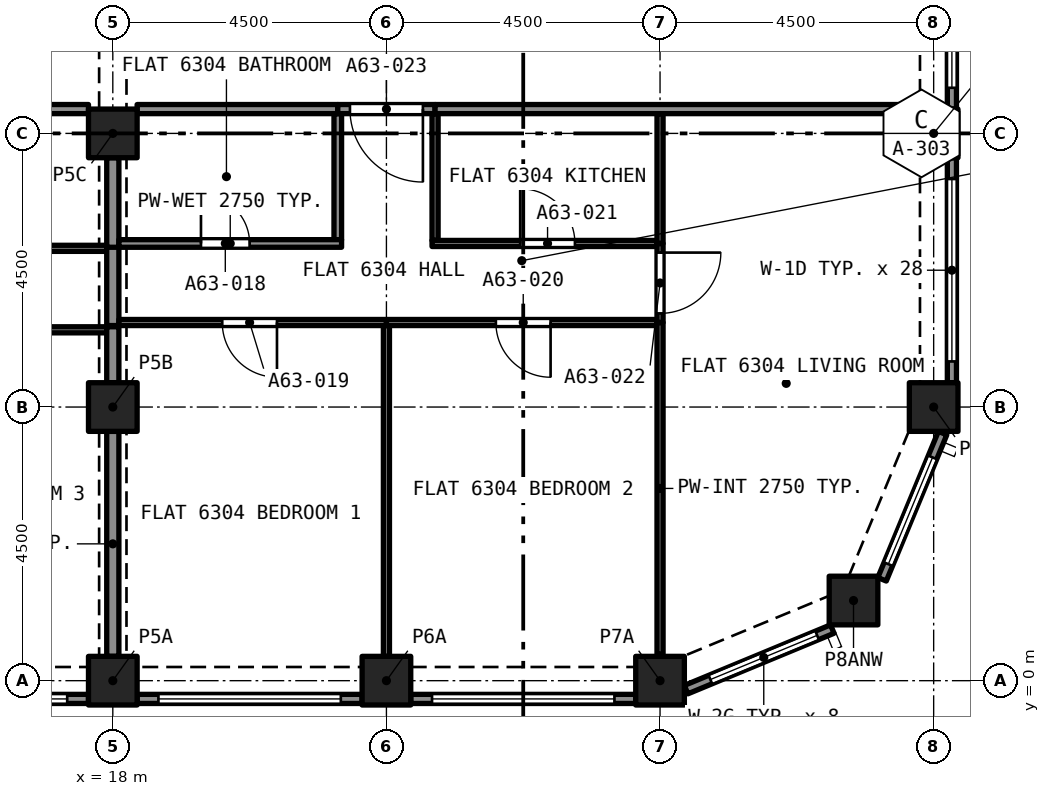
"""IFC4 building model, lengths in metres.
Left out: names, types, materials, properties, quantities, classifications, styles, units other than length and angle.
Written with IfcOpenShell. Run it as: python <this file> out.ifc"""

import sys

from ifc_helpers import new_model, si_unit, direction, frame, frame_2d, origin, origin_2d, place, context, subcontext, project, spatial, rectangle, extrude, element, fill, save


model = new_model("IFC4")
c1 = context("Model", 3, precision=1e-05, world=origin(), true_north=direction((0.0, 1.0)))
c2 = subcontext(c1, "Body", "Model", "MODEL_VIEW")
j1 = project(units=[si_unit("LENGTHUNIT", "METRE"), si_unit("PLANEANGLEUNIT", "RADIAN")], contexts=[c1])
p1 = place(None, origin())
s1 = spatial("IfcSite", under=j1, at=p1, CompositionType="ELEMENT")
p2 = place(p1, origin())
s2 = spatial("IfcBuilding", under=s1, at=p2, CompositionType="ELEMENT")
p3 = place(p2, frame((0.0, 0.0, 226.095)))
s3 = spatial("IfcBuildingStorey", under=s2, at=p3, CompositionType="ELEMENT", Elevation=226.095)
for number, where, z_axis, x_axis in (
    (1, (18.0, 0.0, 0.0), (0.0, 0.0, 1.0), (1.0, 0.0, 0.0)),
    (2, (22.5, 0.0, 0.0), (0.0, 0.0, 1.0), (1.0, 0.0, 0.0)),
    (3, (27.0, 0.0, 0.0), (0.0, 0.0, 1.0), (1.0, 0.0, 0.0)),
    (4, (30.182, 1.318, 0.0), (0.0, 0.0, 1.0), (1.0, 0.0, 0.0)),
    (5, (18.0, 4.5, 0.0), (0.0, 0.0, 1.0), (1.0, 0.0, 0.0)),
    (6, (31.5, 4.5, 0.0), (0.0, 0.0, 1.0), (1.0, 0.0, 0.0)),
    (7, (18.0, 9.0, 0.0), (0.0, 0.0, 1.0), (1.0, 0.0, 0.0)),
    (8, (31.5, 9.0, 0.0), (0.0, 0.0, 1.0), (1.0, 0.0, 0.0)),
):
    element("IfcColumn", number, at=place(p3, frame(where, z_axis=z_axis, x_axis=x_axis)), inside=s3, PredefinedType="COLUMN", context=c2, shape_type="SweptSolid", body=[
        extrude(rectangle(XDim=0.8, YDim=0.8, at=origin_2d()), origin(), (0.0, 0.0, 1.0), 3.2),
    ])
p4 = place(p3, frame((29.833, 0.849, 0.0), z_axis=(0.0, 0.0, 1.0), x_axis=(-0.923885342263, -0.382669406082, 0.0)))
e9 = element("IfcWall", 9, at=p4, inside=s3, PredefinedType="SOLIDWALL", context=c2, shape_type="SweptSolid", body=[
    extrude(rectangle(XDim=2.602, YDim=0.15, at=frame_2d((1.301, 0.0))), origin(), (0.0, 0.0, 1.0), 3.2),
])
p5 = place(p4, frame((0.27, 0.0, 0.45)))
e10 = element("IfcOpeningElement", 10, at=p5, cuts=e9, PredefinedType="OPENING", context=c2, shape_type="SweptSolid", body=[
    extrude(rectangle(XDim=1.9, YDim=1.95, at=frame_2d((0.95, 0.975))), frame((0.0, 0.085, 0.0), z_axis=(0.0, -1.0, 0.0), x_axis=(1.0, 0.0, 0.0)), (0.0, 0.0, 1.0), 0.17),
])
p6 = place(p3, frame((31.647, 4.071, 0.0), z_axis=(0.0, 0.0, 1.0), x_axis=(-0.382669406082, -0.923885342263, 0.0)))
e11 = element("IfcWall", 11, at=p6, inside=s3, PredefinedType="SOLIDWALL", context=c2, shape_type="SweptSolid", body=[
    extrude(rectangle(XDim=2.602, YDim=0.15, at=frame_2d((1.301, 0.0))), origin(), (0.0, 0.0, 1.0), 3.2),
])
p7 = place(p6, frame((0.432, 0.0, 0.45)))
e12 = element("IfcOpeningElement", 12, at=p7, cuts=e11, PredefinedType="OPENING", context=c2, shape_type="SweptSolid", body=[
    extrude(rectangle(XDim=1.9, YDim=1.95, at=frame_2d((0.95, 0.975))), frame((0.0, 0.085, 0.0), z_axis=(0.0, -1.0, 0.0), x_axis=(1.0, 0.0, 0.0)), (0.0, 0.0, 1.0), 0.17),
])
p8 = place(p3, frame((31.8, 8.6, 0.0), z_axis=(0.0, 0.0, 1.0), x_axis=(0.0, -1.0, 0.0)))
e13 = element("IfcWall", 13, at=p8, inside=s3, PredefinedType="SOLIDWALL", context=c2, shape_type="SweptSolid", body=[
    extrude(rectangle(XDim=3.7, YDim=0.15, at=frame_2d((1.85, 0.0))), origin(), (0.0, 0.0, 1.0), 3.2),
])
p9 = place(p8, frame((0.35, 0.0, 0.45)))
e14 = element("IfcOpeningElement", 14, at=p9, cuts=e13, PredefinedType="OPENING", context=c2, shape_type="SweptSolid", body=[
    extrude(rectangle(XDim=3.0, YDim=1.95, at=frame_2d((1.5, 0.975))), frame((0.0, 0.085, 0.0), z_axis=(0.0, -1.0, 0.0), x_axis=(1.0, 0.0, 0.0)), (0.0, 0.0, 1.0), 0.17),
])
p10 = place(p3, frame((31.8, 13.1, 0.0), z_axis=(0.0, 0.0, 1.0), x_axis=(0.0, -1.0, 0.0)))
e15 = element("IfcWall", 15, at=p10, inside=s3, PredefinedType="SOLIDWALL", context=c2, shape_type="SweptSolid", body=[
    extrude(rectangle(XDim=3.7, YDim=0.15, at=frame_2d((1.85, 0.0))), origin(), (0.0, 0.0, 1.0), 3.2),
])
p11 = place(p10, frame((0.35, 0.0, 0.45)))
e16 = element("IfcOpeningElement", 16, at=p11, cuts=e15, PredefinedType="OPENING", context=c2, shape_type="SweptSolid", body=[
    extrude(rectangle(XDim=3.0, YDim=1.95, at=frame_2d((1.5, 0.975))), frame((0.0, 0.085, 0.0), z_axis=(0.0, -1.0, 0.0), x_axis=(1.0, 0.0, 0.0)), (0.0, 0.0, 1.0), 0.17),
])
p12 = place(p3, frame((17.6, -0.3, 0.0), z_axis=(0.0, 0.0, 1.0), x_axis=(-1.0, 0.0, 0.0)))
e17 = element("IfcWall", 17, at=p12, inside=s3, PredefinedType="SOLIDWALL", context=c2, shape_type="SweptSolid", body=[
    extrude(rectangle(XDim=3.7, YDim=0.15, at=frame_2d((1.85, 0.0))), origin(), (0.0, 0.0, 1.0), 3.2),
])
p13 = place(p12, frame((0.35, 0.0, 0.45)))
e18 = element("IfcOpeningElement", 18, at=p13, cuts=e17, PredefinedType="OPENING", context=c2, shape_type="SweptSolid", body=[
    extrude(rectangle(XDim=3.0, YDim=1.95, at=frame_2d((1.5, 0.975))), frame((0.0, 0.085, 0.0), z_axis=(0.0, -1.0, 0.0), x_axis=(1.0, 0.0, 0.0)), (0.0, 0.0, 1.0), 0.17),
])
p14 = place(p3, frame((22.1, -0.3, 0.0), z_axis=(0.0, 0.0, 1.0), x_axis=(-1.0, 0.0, 0.0)))
e19 = element("IfcWall", 19, at=p14, inside=s3, PredefinedType="SOLIDWALL", context=c2, shape_type="SweptSolid", body=[
    extrude(rectangle(XDim=3.7, YDim=0.15, at=frame_2d((1.85, 0.0))), origin(), (0.0, 0.0, 1.0), 3.2),
])
p15 = place(p14, frame((0.35, 0.0, 0.45)))
e20 = element("IfcOpeningElement", 20, at=p15, cuts=e19, PredefinedType="OPENING", context=c2, shape_type="SweptSolid", body=[
    extrude(rectangle(XDim=3.0, YDim=1.95, at=frame_2d((1.5, 0.975))), frame((0.0, 0.085, 0.0), z_axis=(0.0, -1.0, 0.0), x_axis=(1.0, 0.0, 0.0)), (0.0, 0.0, 1.0), 0.17),
])
p16 = place(p3, frame((26.6, -0.3, 0.0), z_axis=(0.0, 0.0, 1.0), x_axis=(-1.0, 0.0, 0.0)))
e21 = element("IfcWall", 21, at=p16, inside=s3, PredefinedType="SOLIDWALL", context=c2, shape_type="SweptSolid", body=[
    extrude(rectangle(XDim=3.7, YDim=0.15, at=frame_2d((1.85, 0.0))), origin(), (0.0, 0.0, 1.0), 3.2),
])
p17 = place(p16, frame((0.35, 0.0, 0.45)))
e22 = element("IfcOpeningElement", 22, at=p17, cuts=e21, PredefinedType="OPENING", context=c2, shape_type="SweptSolid", body=[
    extrude(rectangle(XDim=3.0, YDim=1.95, at=frame_2d((1.5, 0.975))), frame((0.0, 0.085, 0.0), z_axis=(0.0, -1.0, 0.0), x_axis=(1.0, 0.0, 0.0)), (0.0, 0.0, 1.0), 0.17),
])
p18 = place(p3, frame((17.9, 5.77, 0.0), z_axis=(0.0, 0.0, 1.0), x_axis=(-1.0, 0.0, 0.0)))
e23 = element("IfcWall", 23, at=p18, inside=s3, PredefinedType="PARTITIONING", context=c2, shape_type="SweptSolid", body=[
    extrude(rectangle(XDim=4.4, YDim=0.1, at=frame_2d((2.2, 0.0))), origin(), (0.0, 0.0, 1.0), 2.9),
])
p19 = place(p18, frame((1.7, 0.0, 0.0)))
e24 = element("IfcOpeningElement", 24, at=p19, cuts=e23, PredefinedType="OPENING", context=c2, shape_type="SweptSolid", body=[
    extrude(rectangle(XDim=0.9, YDim=2.1, at=frame_2d((0.45, 1.05))), frame((0.0, 0.06, 0.0), z_axis=(0.0, -1.0, 0.0), x_axis=(1.0, 0.0, 0.0)), (0.0, 0.0, 1.0), 0.12),
])
p20 = place(p3, frame((18.0, 4.9, 0.0), z_axis=(0.0, 0.0, 1.0), x_axis=(0.0, 1.0, 0.0)))
e25 = element("IfcWall", 25, at=p20, inside=s3, PredefinedType="PARTITIONING", context=c2, shape_type="SweptSolid", body=[
    extrude(rectangle(XDim=0.92, YDim=0.2, at=frame_2d((0.46, 0.0))), origin(), (0.0, 0.0, 1.0), 2.38),
])
p21 = place(p3, frame((18.0, 0.4, 0.0), z_axis=(0.0, 0.0, 1.0), x_axis=(0.0, 1.0, 0.0)))
e26 = element("IfcWall", 26, at=p21, inside=s3, PredefinedType="PARTITIONING", context=c2, shape_type="SweptSolid", body=[
    extrude(rectangle(XDim=3.7, YDim=0.2, at=frame_2d((1.85, 0.0))), origin(), (0.0, 0.0, 1.0), 2.38),
])
p22 = place(p3, frame((12.0, 7.11, 0.0), z_axis=(0.0, 0.0, 1.0), x_axis=(1.0, 0.0, 0.0)))
e27 = element("IfcWall", 27, at=p22, inside=s3, PredefinedType="PARTITIONING", context=c2, shape_type="SweptSolid", body=[
    extrude(rectangle(XDim=5.9, YDim=0.1, at=frame_2d((2.95, 0.0))), origin(), (0.0, 0.0, 1.0), 2.9),
])
p23 = place(p22, frame((2.575, 0.0, 0.0)))
e28 = element("IfcOpeningElement", 28, at=p23, cuts=e27, PredefinedType="OPENING", context=c2, shape_type="SweptSolid", body=[
    extrude(rectangle(XDim=0.9, YDim=2.1, at=frame_2d((0.45, 1.05))), frame((0.0, 0.06, 0.0), z_axis=(0.0, -1.0, 0.0), x_axis=(1.0, 0.0, 0.0)), (0.0, 0.0, 1.0), 0.12),
])
p24 = place(p3, frame((18.0, 5.84, 0.0), z_axis=(0.0, 0.0, 1.0), x_axis=(0.0, 1.0, 0.0)))
e29 = element("IfcWall", 29, at=p24, inside=s3, PredefinedType="PARTITIONING", context=c2, shape_type="SweptSolid", body=[
    extrude(rectangle(XDim=1.32, YDim=0.2, at=frame_2d((0.66, 0.0))), origin(), (0.0, 0.0, 1.0), 2.38),
])
p25 = place(p3, frame((18.0, 7.127, 0.0), z_axis=(0.0, 0.0, 1.0), x_axis=(0.0, 1.0, 0.0)))
e30 = element("IfcWall", 30, at=p25, inside=s3, PredefinedType="PARTITIONING", context=c2, shape_type="SweptSolid", body=[
    extrude(rectangle(XDim=1.473, YDim=0.2, at=frame_2d((0.736, 0.0))), origin(), (0.0, 0.0, 1.0), 2.38),
])
p26 = place(p3, frame((12.05, 9.4, 0.0), z_axis=(0.0, 0.0, 1.0), x_axis=(1.0, 0.0, 0.0)))
e31 = element("IfcWall", 31, at=p26, inside=s3, PredefinedType="PARTITIONING", context=c2, shape_type="SweptSolid", body=[
    extrude(rectangle(XDim=5.55, YDim=0.15, at=frame_2d((2.775, 0.0))), origin(), (0.0, 0.0, 1.0), 2.9),
])
p27 = place(p3, frame((21.7, 7.252, 0.0), z_axis=(0.0, 0.0, 1.0), x_axis=(0.0, 1.0, 0.0)))
e32 = element("IfcWall", 32, at=p27, inside=s3, PredefinedType="PARTITIONING", context=c2, shape_type="SweptSolid", body=[
    extrude(rectangle(XDim=2.073, YDim=0.125, at=frame_2d((1.036, 0.0))), origin(), (0.0, 0.0, 1.0), 2.75),
])
p28 = place(p3, frame((18.1, 7.19, 0.0), z_axis=(0.0, 0.0, 1.0), x_axis=(1.0, 0.0, 0.0)))
e33 = element("IfcWall", 33, at=p28, inside=s3, PredefinedType="PARTITIONING", context=c2, shape_type="SweptSolid", body=[
    extrude(rectangle(XDim=3.662, YDim=0.125, at=frame_2d((1.831, 0.0))), origin(), (0.0, 0.0, 1.0), 2.75),
])
p29 = place(p28, frame((1.35, 0.0, 0.0)))
e34 = element("IfcOpeningElement", 34, at=p29, cuts=e33, PredefinedType="OPENING", context=c2, shape_type="SweptSolid", body=[
    extrude(rectangle(XDim=0.8, YDim=2.1, at=frame_2d((0.4, 1.05))), frame((0.0, 0.073, 0.0), z_axis=(0.0, -1.0, 0.0), x_axis=(1.0, 0.0, 0.0)), (0.0, 0.0, 1.0), 0.145),
])
p30 = place(p3, frame((18.4, 9.4, 0.0), z_axis=(0.0, 0.0, 1.0), x_axis=(1.0, 0.0, 0.0)))
e35 = element("IfcWall", 35, at=p30, inside=s3, PredefinedType="PARTITIONING", context=c2, shape_type="SweptSolid", body=[
    extrude(rectangle(XDim=3.3, YDim=0.15, at=frame_2d((1.65, 0.0))), origin(), (0.0, 0.0, 1.0), 2.75),
])
p31 = place(p3, frame((22.5, 0.4, 0.0), z_axis=(0.0, 0.0, 1.0), x_axis=(0.0, 1.0, 0.0)))
e36 = element("IfcWall", 36, at=p31, inside=s3, PredefinedType="PARTITIONING", context=c2, shape_type="SweptSolid", body=[
    extrude(rectangle(XDim=5.44, YDim=0.1, at=frame_2d((2.72, 0.0))), origin(), (0.0, 0.0, 1.0), 2.75),
])
p32 = place(p3, frame((22.5, 5.89, 0.0), z_axis=(0.0, 0.0, 1.0), x_axis=(-1.0, 0.0, 0.0)))
e37 = element("IfcWall", 37, at=p32, inside=s3, PredefinedType="PARTITIONING", context=c2, shape_type="SweptSolid", body=[
    extrude(rectangle(XDim=4.4, YDim=0.1, at=frame_2d((2.2, 0.0))), origin(), (0.0, 0.0, 1.0), 2.75),
])
p33 = place(p32, frame((1.8, 0.0, 0.0)))
e38 = element("IfcOpeningElement", 38, at=p33, cuts=e37, PredefinedType="OPENING", context=c2, shape_type="SweptSolid", body=[
    extrude(rectangle(XDim=0.9, YDim=2.1, at=frame_2d((0.45, 1.05))), frame((0.0, 0.06, 0.0), z_axis=(0.0, -1.0, 0.0), x_axis=(1.0, 0.0, 0.0)), (0.0, 0.0, 1.0), 0.12),
])
p34 = place(p3, frame((26.95, 5.89, 0.0), z_axis=(0.0, 0.0, 1.0), x_axis=(-1.0, 0.0, 0.0)))
e39 = element("IfcWall", 39, at=p34, inside=s3, PredefinedType="PARTITIONING", context=c2, shape_type="SweptSolid", body=[
    extrude(rectangle(XDim=4.45, YDim=0.1, at=frame_2d((2.225, 0.0))), origin(), (0.0, 0.0, 1.0), 2.75),
])
p35 = place(p34, frame((1.75, 0.0, 0.0)))
e40 = element("IfcOpeningElement", 40, at=p35, cuts=e39, PredefinedType="OPENING", context=c2, shape_type="SweptSolid", body=[
    extrude(rectangle(XDim=0.9, YDim=2.1, at=frame_2d((0.45, 1.05))), frame((0.0, 0.06, 0.0), z_axis=(0.0, -1.0, 0.0), x_axis=(1.0, 0.0, 0.0)), (0.0, 0.0, 1.0), 0.12),
])
p36 = place(p3, frame((27.0, 0.433, 0.0), z_axis=(0.0, 0.0, 1.0), x_axis=(0.0, 1.0, 0.0)))
e41 = element("IfcWall", 41, at=p36, inside=s3, PredefinedType="PARTITIONING", context=c2, shape_type="SweptSolid", body=[
    extrude(rectangle(XDim=5.457, YDim=0.1, at=frame_2d((2.729, 0.0))), origin(), (0.0, 0.0, 1.0), 2.75),
])
p37 = place(p3, frame((23.3, 7.24, 0.0), z_axis=(0.0, 0.0, 1.0), x_axis=(0.0, 1.0, 0.0)))
e42 = element("IfcWall", 42, at=p37, inside=s3, PredefinedType="PARTITIONING", context=c2, shape_type="SweptSolid", body=[
    extrude(rectangle(XDim=2.085, YDim=0.1, at=frame_2d((1.042, 0.0))), origin(), (0.0, 0.0, 1.0), 2.75),
])
p38 = place(p3, frame((23.25, 7.19, 0.0), z_axis=(0.0, 0.0, 1.0), x_axis=(1.0, 0.0, 0.0)))
e43 = element("IfcWall", 43, at=p38, inside=s3, PredefinedType="PARTITIONING", context=c2, shape_type="SweptSolid", body=[
    extrude(rectangle(XDim=3.7, YDim=0.1, at=frame_2d((1.85, 0.0))), origin(), (0.0, 0.0, 1.0), 2.75),
])
p39 = place(p38, frame((1.45, 0.0, 0.0)))
e44 = element("IfcOpeningElement", 44, at=p39, cuts=e43, PredefinedType="OPENING", context=c2, shape_type="SweptSolid", body=[
    extrude(rectangle(XDim=0.9, YDim=2.1, at=frame_2d((0.45, 1.05))), frame((0.0, 0.06, 0.0), z_axis=(0.0, -1.0, 0.0), x_axis=(1.0, 0.0, 0.0)), (0.0, 0.0, 1.0), 0.12),
])
p40 = place(p3, frame((27.0, 7.19, 0.0), z_axis=(0.0, 0.0, 1.0), x_axis=(0.0, -1.0, 0.0)))
e45 = element("IfcWall", 45, at=p40, inside=s3, PredefinedType="PARTITIONING", context=c2, shape_type="SweptSolid", body=[
    extrude(rectangle(XDim=1.3, YDim=0.1, at=frame_2d((0.65, 0.0))), origin(), (0.0, 0.0, 1.0), 2.75),
])
p41 = place(p40, frame((0.15, 0.0, 0.0)))
e46 = element("IfcOpeningElement", 46, at=p41, cuts=e45, PredefinedType="OPENING", context=c2, shape_type="SweptSolid", body=[
    extrude(rectangle(XDim=1.0, YDim=2.1, at=frame_2d((0.5, 1.05))), frame((0.0, 0.06, 0.0), z_axis=(0.0, -1.0, 0.0), x_axis=(1.0, 0.0, 0.0)), (0.0, 0.0, 1.0), 0.12),
])
p42 = place(p3, frame((23.3, 9.4, 0.0), z_axis=(0.0, 0.0, 1.0), x_axis=(-1.0, 0.0, 0.0)))
e47 = element("IfcWall", 47, at=p42, inside=s3, PredefinedType="PARTITIONING", context=c2, shape_type="SweptSolid", body=[
    extrude(rectangle(XDim=1.6, YDim=0.15, at=frame_2d((0.8, 0.0))), origin(), (0.0, 0.0, 1.0), 2.75),
])
p43 = place(p42, frame((0.2, 0.0, 0.0)))
e48 = element("IfcOpeningElement", 48, at=p43, cuts=e47, PredefinedType="OPENING", context=c2, shape_type="SweptSolid", body=[
    extrude(rectangle(XDim=1.2, YDim=2.4, at=frame_2d((0.6, 1.2))), frame((0.0, 0.085, 0.0), z_axis=(0.0, -1.0, 0.0), x_axis=(1.0, 0.0, 0.0)), (0.0, 0.0, 1.0), 0.17),
])
p44 = place(p3, frame((27.0, 7.19, 0.0), z_axis=(0.0, 0.0, 1.0), x_axis=(0.0, 1.0, 0.0)))
e49 = element("IfcWall", 49, at=p44, inside=s3, PredefinedType="PARTITIONING", context=c2, shape_type="SweptSolid", body=[
    extrude(rectangle(XDim=2.135, YDim=0.1, at=frame_2d((1.067, 0.0))), origin(), (0.0, 0.0, 1.0), 2.75),
])
p45 = place(p3, frame((23.3, 9.4, 0.0), z_axis=(0.0, 0.0, 1.0), x_axis=(1.0, 0.0, 0.0)))
e50 = element("IfcWall", 50, at=p45, inside=s3, PredefinedType="PARTITIONING", context=c2, shape_type="SweptSolid", body=[
    extrude(rectangle(XDim=7.8, YDim=0.15, at=frame_2d((3.9, 0.0))), origin(), (0.0, 0.0, 1.0), 2.75),
])
p46 = place(p5, origin())
e51 = element("IfcWindow", 51, at=p46, inside=s3, PartitioningType="SINGLE_PANEL", PredefinedType="WINDOW", context=c2, shape_type="SweptSolid", body=[
    extrude(rectangle(XDim=1.9, YDim=1.95, at=frame_2d((0.95, 0.975))), frame((0.0, 0.03, 0.0), z_axis=(0.0, -1.0, 0.0), x_axis=(1.0, 0.0, 0.0)), (0.0, 0.0, 1.0), 0.06),
])
fill(e10, e51)
p47 = place(p7, origin())
e52 = element("IfcWindow", 52, at=p47, inside=s3, PartitioningType="SINGLE_PANEL", PredefinedType="WINDOW", context=c2, shape_type="SweptSolid", body=[
    extrude(rectangle(XDim=1.9, YDim=1.95, at=frame_2d((0.95, 0.975))), frame((0.0, 0.03, 0.0), z_axis=(0.0, -1.0, 0.0), x_axis=(1.0, 0.0, 0.0)), (0.0, 0.0, 1.0), 0.06),
])
fill(e12, e52)
p48 = place(p9, origin())
e53 = element("IfcWindow", 53, at=p48, inside=s3, PartitioningType="SINGLE_PANEL", PredefinedType="WINDOW", context=c2, shape_type="SweptSolid", body=[
    extrude(rectangle(XDim=3.0, YDim=1.95, at=frame_2d((1.5, 0.975))), frame((0.0, 0.03, 0.0), z_axis=(0.0, -1.0, 0.0), x_axis=(1.0, 0.0, 0.0)), (0.0, 0.0, 1.0), 0.06),
])
fill(e14, e53)
p49 = place(p11, origin())
e54 = element("IfcWindow", 54, at=p49, inside=s3, PartitioningType="SINGLE_PANEL", PredefinedType="WINDOW", context=c2, shape_type="SweptSolid", body=[
    extrude(rectangle(XDim=3.0, YDim=1.95, at=frame_2d((1.5, 0.975))), frame((0.0, 0.03, 0.0), z_axis=(0.0, -1.0, 0.0), x_axis=(1.0, 0.0, 0.0)), (0.0, 0.0, 1.0), 0.06),
])
fill(e16, e54)
p50 = place(p13, origin())
e55 = element("IfcWindow", 55, at=p50, inside=s3, PartitioningType="SINGLE_PANEL", PredefinedType="WINDOW", context=c2, shape_type="SweptSolid", body=[
    extrude(rectangle(XDim=3.0, YDim=1.95, at=frame_2d((1.5, 0.975))), frame((0.0, 0.03, 0.0), z_axis=(0.0, -1.0, 0.0), x_axis=(1.0, 0.0, 0.0)), (0.0, 0.0, 1.0), 0.06),
])
fill(e18, e55)
p51 = place(p15, origin())
e56 = element("IfcWindow", 56, at=p51, inside=s3, PartitioningType="SINGLE_PANEL", PredefinedType="WINDOW", context=c2, shape_type="SweptSolid", body=[
    extrude(rectangle(XDim=3.0, YDim=1.95, at=frame_2d((1.5, 0.975))), frame((0.0, 0.03, 0.0), z_axis=(0.0, -1.0, 0.0), x_axis=(1.0, 0.0, 0.0)), (0.0, 0.0, 1.0), 0.06),
])
fill(e20, e56)
p52 = place(p17, origin())
e57 = element("IfcWindow", 57, at=p52, inside=s3, PartitioningType="SINGLE_PANEL", PredefinedType="WINDOW", context=c2, shape_type="SweptSolid", body=[
    extrude(rectangle(XDim=3.0, YDim=1.95, at=frame_2d((1.5, 0.975))), frame((0.0, 0.03, 0.0), z_axis=(0.0, -1.0, 0.0), x_axis=(1.0, 0.0, 0.0)), (0.0, 0.0, 1.0), 0.06),
])
fill(e22, e57)
p53 = place(p29, origin())
e58 = element("IfcDoor", 58, at=p53, inside=s3, OperationType="SINGLE_SWING_LEFT", PredefinedType="DOOR", context=c2, shape_type="SweptSolid", body=[
    extrude(rectangle(XDim=0.8, YDim=2.1, at=frame_2d((0.4, 1.05))), frame((0.0, 0.025, 0.0), z_axis=(0.0, -1.0, 0.0), x_axis=(1.0, 0.0, 0.0)), (0.0, 0.0, 1.0), 0.05),
])
fill(e34, e58)
p54 = place(p33, origin())
e59 = element("IfcDoor", 59, at=p54, inside=s3, OperationType="SINGLE_SWING_RIGHT", PredefinedType="DOOR", context=c2, shape_type="SweptSolid", body=[
    extrude(rectangle(XDim=0.9, YDim=2.1, at=frame_2d((0.45, 1.05))), frame((0.0, 0.025, 0.0), z_axis=(0.0, -1.0, 0.0), x_axis=(1.0, 0.0, 0.0)), (0.0, 0.0, 1.0), 0.05),
])
fill(e38, e59)
p55 = place(p35, origin())
e60 = element("IfcDoor", 60, at=p55, inside=s3, OperationType="SINGLE_SWING_LEFT", PredefinedType="DOOR", context=c2, shape_type="SweptSolid", body=[
    extrude(rectangle(XDim=0.9, YDim=2.1, at=frame_2d((0.45, 1.05))), frame((0.0, 0.025, 0.0), z_axis=(0.0, -1.0, 0.0), x_axis=(1.0, 0.0, 0.0)), (0.0, 0.0, 1.0), 0.05),
])
fill(e40, e60)
p56 = place(p39, origin())
e61 = element("IfcDoor", 61, at=p56, inside=s3, OperationType="SINGLE_SWING_RIGHT", PredefinedType="DOOR", context=c2, shape_type="SweptSolid", body=[
    extrude(rectangle(XDim=0.9, YDim=2.1, at=frame_2d((0.45, 1.05))), frame((0.0, 0.025, 0.0), z_axis=(0.0, -1.0, 0.0), x_axis=(1.0, 0.0, 0.0)), (0.0, 0.0, 1.0), 0.05),
])
fill(e44, e61)
p57 = place(p41, origin())
e62 = element("IfcDoor", 62, at=p57, inside=s3, OperationType="SINGLE_SWING_LEFT", PredefinedType="DOOR", context=c2, shape_type="SweptSolid", body=[
    extrude(rectangle(XDim=1.0, YDim=2.1, at=frame_2d((0.5, 1.05))), frame((0.0, 0.025, 0.0), z_axis=(0.0, -1.0, 0.0), x_axis=(1.0, 0.0, 0.0)), (0.0, 0.0, 1.0), 0.05),
])
fill(e46, e62)
p58 = place(p43, origin())
e63 = element("IfcDoor", 63, at=p58, inside=s3, OperationType="SINGLE_SWING_LEFT", PredefinedType="DOOR", context=c2, shape_type="SweptSolid", body=[
    extrude(rectangle(XDim=1.2, YDim=2.4, at=frame_2d((0.6, 1.2))), frame((0.0, 0.025, 0.0), z_axis=(0.0, -1.0, 0.0), x_axis=(1.0, 0.0, 0.0)), (0.0, 0.0, 1.0), 0.05),
])
fill(e48, e63)
save(model, sys.argv[1])
